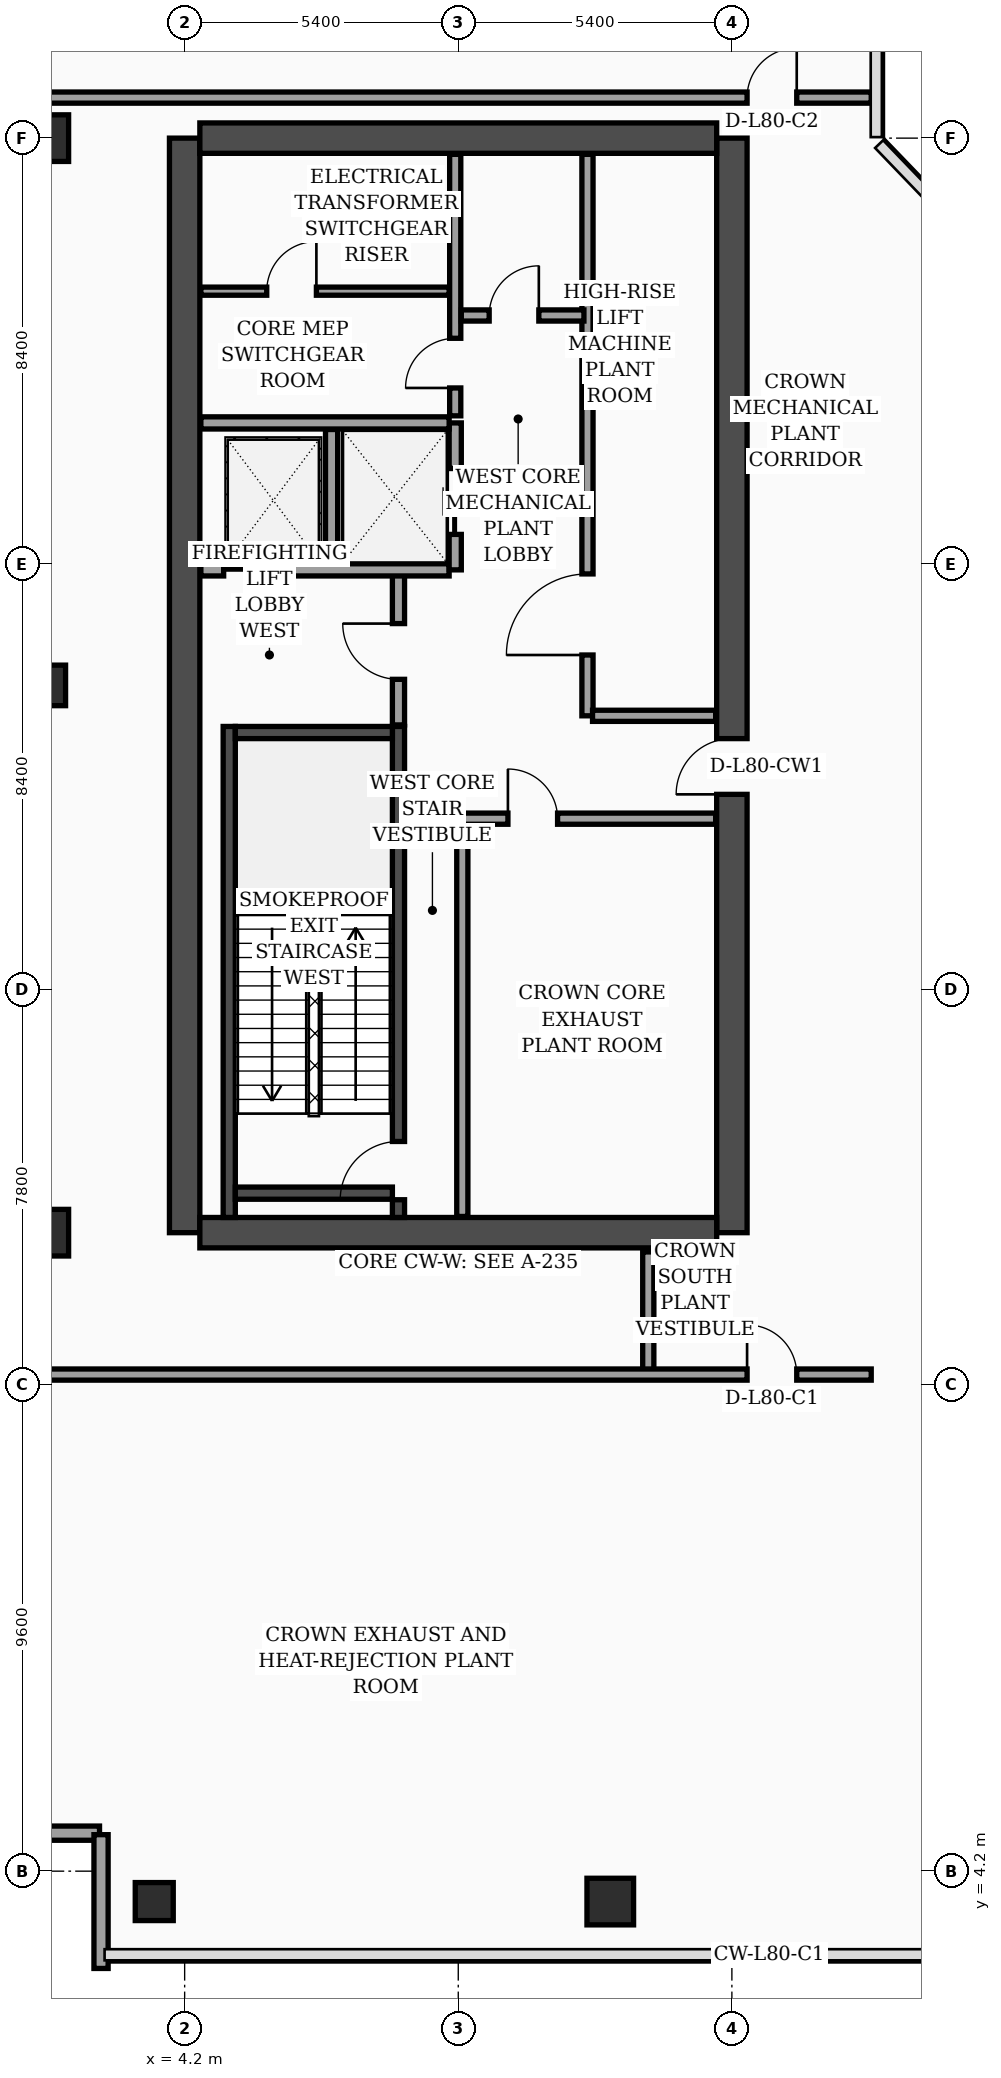
"""IFC4 building model, lengths in metres.
Left out: names, types, materials, properties, quantities, classifications, styles, units other than length and angle.
Written with IfcOpenShell. Run it as: python <this file> out.ifc"""

import sys

from ifc_helpers import new_model, si_unit, direction, frame, frame_2d, origin, origin_2d, place, context, subcontext, project, spatial, rectangle, hollow_rectangle, extrude, element, fill, save


model = new_model("IFC4")
c1 = context("Model", 3, precision=1e-05, world=origin(), true_north=direction((0.0, 1.0)))
c2 = subcontext(c1, "Body", "Model", "MODEL_VIEW")
j1 = project(units=[si_unit("LENGTHUNIT", "METRE"), si_unit("PLANEANGLEUNIT", "RADIAN")], contexts=[c1])
p1 = place(None, origin())
s1 = spatial("IfcSite", under=j1, at=p1, CompositionType="ELEMENT")
p2 = place(p1, origin())
s2 = spatial("IfcBuilding", under=s1, at=p2, CompositionType="ELEMENT")
p3 = place(p2, frame((0.0, 0.0, 325.5)))
s3 = spatial("IfcBuildingStorey", under=s2, at=p3, CompositionType="ELEMENT", Elevation=325.5)
p4 = place(p3, frame((4.2, 16.8, 0.0), z_axis=(0.0, 0.0, 1.0), x_axis=(0.0, 1.0, 0.0)))
e1 = element("IfcWall", 1, at=p4, inside=s3, PredefinedType="SHEAR", context=c2, shape_type="SweptSolid", body=[
    extrude(rectangle(XDim=21.6, YDim=0.6, at=frame_2d((10.8, 0.0))), origin(), (0.0, 0.0, 1.0), 4.76),
])
p5 = place(p3, frame((15.0, 16.8, 0.0), z_axis=(0.0, 0.0, 1.0), x_axis=(0.0, 1.0, 0.0)))
e2 = element("IfcWall", 2, at=p5, inside=s3, PredefinedType="SHEAR", context=c2, shape_type="SweptSolid", body=[
    extrude(rectangle(XDim=21.6, YDim=0.6, at=frame_2d((10.8, 0.0))), origin(), (0.0, 0.0, 1.0), 4.76),
])
p6 = place(p5, frame((8.65, 0.0, 0.0)))
e3 = element("IfcOpeningElement", 3, at=p6, cuts=e2, PredefinedType="OPENING", context=c2, shape_type="SweptSolid", body=[
    extrude(rectangle(XDim=1.1, YDim=2.2, at=frame_2d((0.55, 1.1))), frame((0.0, 0.31, 0.0), z_axis=(0.0, -1.0, 0.0), x_axis=(1.0, 0.0, 0.0)), (0.0, 0.0, 1.0), 0.62),
])
for number, where, z_axis, x_axis in (
    (4, (4.5, 38.4, 0.0), (0.0, 0.0, 1.0), (1.0, 0.0, 0.0)),
    (5, (4.5, 16.8, 0.0), (0.0, 0.0, 1.0), (1.0, 0.0, 0.0)),
):
    element("IfcWall", number, at=place(p3, frame(where, z_axis=z_axis, x_axis=x_axis)), inside=s3, PredefinedType="SHEAR", context=c2, shape_type="SweptSolid", body=[
        extrude(rectangle(XDim=10.2, YDim=0.6, at=frame_2d((5.1, 0.0))), origin(), (0.0, 0.0, 1.0), 4.76),
    ])
p7 = place(p3, frame((5.08, 17.1, 0.0), z_axis=(0.0, 0.0, 1.0), x_axis=(0.0, 1.0, 0.0)))
e6 = element("IfcWall", 6, at=p7, inside=s3, PredefinedType="SOLIDWALL", context=c2, shape_type="SweptSolid", body=[
    extrude(rectangle(XDim=9.69, YDim=0.24, at=frame_2d((4.845, 0.0))), origin(), (0.0, 0.0, 1.0), 4.76),
])
p8 = place(p3, frame((8.42, 17.1, 0.0), z_axis=(0.0, 0.0, 1.0), x_axis=(0.0, 1.0, 0.0)))
e7 = element("IfcWall", 7, at=p8, inside=s3, PredefinedType="SOLIDWALL", context=c2, shape_type="SweptSolid", body=[
    extrude(rectangle(XDim=9.69, YDim=0.24, at=frame_2d((4.845, 0.0))), origin(), (0.0, 0.0, 1.0), 4.76),
])
p9 = place(p8, frame((0.35, 0.0, 0.0)))
e8 = element("IfcOpeningElement", 8, at=p9, cuts=e7, PredefinedType="OPENING", context=c2, shape_type="SweptSolid", body=[
    extrude(rectangle(XDim=1.15, YDim=2.2, at=frame_2d((0.575, 1.1))), frame((0.0, 0.13, 0.0), z_axis=(0.0, -1.0, 0.0), x_axis=(1.0, 0.0, 0.0)), (0.0, 0.0, 1.0), 0.26),
])
for number, where, z_axis, x_axis in (
    (9, (5.2, 17.58, 0.0), (0.0, 0.0, 1.0), (1.0, 0.0, 0.0)),
    (10, (5.2, 26.67, 0.0), (0.0, 0.0, 1.0), (1.0, 0.0, 0.0)),
):
    element("IfcWall", number, at=place(p3, frame(where, z_axis=z_axis, x_axis=x_axis)), inside=s3, PredefinedType="SOLIDWALL", context=c2, shape_type="SweptSolid", body=[
        extrude(rectangle(XDim=3.1, YDim=0.24, at=frame_2d((1.55, 0.0))), origin(), (0.0, 0.0, 1.0), 4.76),
    ])
p10 = place(p3, frame((3.6, 3.6, 0.0), z_axis=(0.0, 0.0, 1.0), x_axis=(1.0, 0.0, 0.0)))
e11 = element("IfcColumn", 11, at=p10, inside=s3, PredefinedType="COLUMN", context=c2, shape_type="SweptSolid", body=[
    extrude(hollow_rectangle(XDim=0.75, YDim=0.75, WallThickness=0.032, at=origin_2d()), origin(), (0.0, 0.0, 1.0), 4.76),
])
p11 = place(p3, frame((1.45, 16.8, 0.0), z_axis=(0.0, 0.0, 1.0), x_axis=(1.0, 0.0, 0.0)))
e12 = element("IfcColumn", 12, at=p11, inside=s3, PredefinedType="COLUMN", context=c2, shape_type="SweptSolid", body=[
    extrude(rectangle(XDim=0.92, YDim=0.92, at=origin_2d()), origin(), (0.0, 0.0, 1.0), 4.76),
])
p12 = place(p3, frame((1.45, 27.6, 0.0), z_axis=(0.0, 0.0, 1.0), x_axis=(1.0, 0.0, 0.0)))
e13 = element("IfcColumn", 13, at=p12, inside=s3, PredefinedType="COLUMN", context=c2, shape_type="SweptSolid", body=[
    extrude(rectangle(XDim=0.8, YDim=0.8, at=origin_2d()), origin(), (0.0, 0.0, 1.0), 4.76),
])
for number, where, z_axis, x_axis in (
    (14, (1.45, 38.4, 0.0), (0.0, 0.0, 1.0), (1.0, 0.0, 0.0)),
    (15, (12.6, 3.6, 0.0), (0.0, 0.0, 1.0), (1.0, 0.0, 0.0)),
):
    element("IfcColumn", number, at=place(p3, frame(where, z_axis=z_axis, x_axis=x_axis)), inside=s3, PredefinedType="COLUMN", context=c2, shape_type="SweptSolid", body=[
        extrude(rectangle(XDim=0.92, YDim=0.92, at=origin_2d()), origin(), (0.0, 0.0, 1.0), 4.76),
    ])
p13 = place(p3, frame((-0.12, 4.95, 0.0), z_axis=(0.0, 0.0, 1.0), x_axis=(1.0, 0.0, 0.0)))
e16 = element("IfcWall", 16, at=p13, inside=s3, PredefinedType="SOLIDWALL", context=c2, shape_type="SweptSolid", body=[
    extrude(rectangle(XDim=2.64, YDim=0.28, at=frame_2d((1.32, 0.0))), origin(), (0.0, 0.0, 1.0), 4.76),
])
p14 = place(p3, frame((2.55, 4.92, 0.0), z_axis=(0.0, 0.0, 1.0), x_axis=(0.0, -1.0, 0.0)))
e17 = element("IfcWall", 17, at=p14, inside=s3, PredefinedType="SOLIDWALL", context=c2, shape_type="SweptSolid", body=[
    extrude(rectangle(XDim=2.64, YDim=0.28, at=frame_2d((1.32, 0.0))), origin(), (0.0, 0.0, 1.0), 4.76),
])
p15 = place(p3, frame((8.42, 26.82, 0.0), z_axis=(0.0, 0.0, 1.0), x_axis=(0.0, 1.0, 0.0)))
e18 = element("IfcWall", 18, at=p15, inside=s3, PredefinedType="SOLIDWALL", context=c2, shape_type="SweptSolid", body=[
    extrude(rectangle(XDim=3.0, YDim=0.24, at=frame_2d((1.5, 0.0))), origin(), (0.0, 0.0, 1.0), 4.76),
])
p16 = place(p15, frame((0.9, 0.0, 0.0)))
e19 = element("IfcOpeningElement", 19, at=p16, cuts=e18, PredefinedType="OPENING", context=c2, shape_type="SweptSolid", body=[
    extrude(rectangle(XDim=1.1, YDim=2.2, at=frame_2d((0.55, 1.1))), frame((0.0, 0.13, 0.0), z_axis=(0.0, -1.0, 0.0), x_axis=(1.0, 0.0, 0.0)), (0.0, 0.0, 1.0), 0.26),
])
p17 = place(p3, frame((4.52, 29.88, 0.0), z_axis=(0.0, 0.0, 1.0), x_axis=(1.0, 0.0, 0.0)))
e20 = element("IfcWall", 20, at=p17, inside=s3, PredefinedType="SOLIDWALL", context=c2, shape_type="SweptSolid", body=[
    extrude(rectangle(XDim=4.9, YDim=0.24, at=frame_2d((2.45, 0.0))), origin(), (0.0, 0.0, 1.0), 4.76),
])
p18 = place(p17, frame((0.45, 0.0, 0.0)))
e21 = element("IfcOpeningElement", 21, at=p18, cuts=e20, PredefinedType="OPENING", context=c2, shape_type="SweptSolid", body=[
    extrude(rectangle(XDim=1.3, YDim=2.35, at=frame_2d((0.65, 1.175))), frame((0.0, 0.13, 0.0), z_axis=(0.0, -1.0, 0.0), x_axis=(1.0, 0.0, 0.0)), (0.0, 0.0, 1.0), 0.26),
])
p19 = place(p3, frame((7.1, 30.02, 0.0), z_axis=(0.0, 0.0, 1.0), x_axis=(0.0, 1.0, 0.0)))
e22 = element("IfcWall", 22, at=p19, inside=s3, PredefinedType="SOLIDWALL", context=c2, shape_type="SweptSolid", body=[
    extrude(rectangle(XDim=2.63, YDim=0.24, at=frame_2d((1.315, 0.0))), origin(), (0.0, 0.0, 1.0), 4.76),
])
p20 = place(p3, frame((9.54, 29.88, 0.0), z_axis=(0.0, 0.0, 1.0), x_axis=(0.0, 1.0, 0.0)))
e23 = element("IfcWall", 23, at=p20, inside=s3, PredefinedType="SOLIDWALL", context=c2, shape_type="SweptSolid", body=[
    extrude(rectangle(XDim=2.9, YDim=0.24, at=frame_2d((1.45, 0.0))), origin(), (0.0, 0.0, 1.0), 4.76),
])
p21 = place(p20, frame((0.7, 0.0, 0.0)))
e24 = element("IfcOpeningElement", 24, at=p21, cuts=e23, PredefinedType="OPENING", context=c2, shape_type="SweptSolid", body=[
    extrude(rectangle(XDim=1.3, YDim=2.35, at=frame_2d((0.65, 1.175))), frame((0.0, 0.13, 0.0), z_axis=(0.0, -1.0, 0.0), x_axis=(1.0, 0.0, 0.0)), (0.0, 0.0, 1.0), 0.26),
])
p22 = place(p3, frame((4.52, 32.78, 0.0), z_axis=(0.0, 0.0, 1.0), x_axis=(1.0, 0.0, 0.0)))
e25 = element("IfcWall", 25, at=p22, inside=s3, PredefinedType="SOLIDWALL", context=c2, shape_type="SweptSolid", body=[
    extrude(rectangle(XDim=4.9, YDim=0.24, at=frame_2d((2.45, 0.0))), origin(), (0.0, 0.0, 1.0), 4.76),
])
p23 = place(p3, frame((9.68, 17.12, 0.0), z_axis=(0.0, 0.0, 1.0), x_axis=(0.0, 1.0, 0.0)))
e26 = element("IfcWall", 26, at=p23, inside=s3, PredefinedType="SOLIDWALL", context=c2, shape_type="SweptSolid", body=[
    extrude(rectangle(XDim=7.88, YDim=0.22, at=frame_2d((3.94, 0.0))), origin(), (0.0, 0.0, 1.0), 4.76),
])
p24 = place(p3, frame((4.52, 35.38, 0.0), z_axis=(0.0, 0.0, 1.0), x_axis=(1.0, 0.0, 0.0)))
e27 = element("IfcWall", 27, at=p24, inside=s3, PredefinedType="PARTITIONING", context=c2, shape_type="SweptSolid", body=[
    extrude(rectangle(XDim=4.9, YDim=0.16, at=frame_2d((2.45, 0.0))), origin(), (0.0, 0.0, 1.0), 4.76),
])
p25 = place(p24, frame((1.3, 0.0, 0.0)))
e28 = element("IfcOpeningElement", 28, at=p25, cuts=e27, PredefinedType="OPENING", context=c2, shape_type="SweptSolid", body=[
    extrude(rectangle(XDim=0.98, YDim=2.15, at=frame_2d((0.49, 1.075))), frame((0.0, 0.09, 0.0), z_axis=(0.0, -1.0, 0.0), x_axis=(1.0, 0.0, 0.0)), (0.0, 0.0, 1.0), 0.18),
])
p26 = place(p3, frame((9.54, 32.92, 0.0), z_axis=(0.0, 0.0, 1.0), x_axis=(0.0, 1.0, 0.0)))
e29 = element("IfcWall", 29, at=p26, inside=s3, PredefinedType="SOLIDWALL", context=c2, shape_type="SweptSolid", body=[
    extrude(rectangle(XDim=5.16, YDim=0.22, at=frame_2d((2.58, 0.0))), origin(), (0.0, 0.0, 1.0), 4.76),
])
p27 = place(p26, frame((0.55, 0.0, 0.0)))
e30 = element("IfcOpeningElement", 30, at=p27, cuts=e29, PredefinedType="OPENING", context=c2, shape_type="SweptSolid", body=[
    extrude(rectangle(XDim=0.98, YDim=2.15, at=frame_2d((0.49, 1.075))), frame((0.0, 0.12, 0.0), z_axis=(0.0, -1.0, 0.0), x_axis=(1.0, 0.0, 0.0)), (0.0, 0.0, 1.0), 0.24),
])
p28 = place(p3, frame((9.68, 24.97, 0.0), z_axis=(0.0, 0.0, 1.0), x_axis=(1.0, 0.0, 0.0)))
e31 = element("IfcWall", 31, at=p28, inside=s3, PredefinedType="SOLIDWALL", context=c2, shape_type="SweptSolid", body=[
    extrude(rectangle(XDim=5.0, YDim=0.22, at=frame_2d((2.5, 0.0))), origin(), (0.0, 0.0, 1.0), 4.76),
])
p29 = place(p28, frame((0.9, 0.0, 0.0)))
e32 = element("IfcOpeningElement", 32, at=p29, cuts=e31, PredefinedType="OPENING", context=c2, shape_type="SweptSolid", body=[
    extrude(rectangle(XDim=0.98, YDim=2.15, at=frame_2d((0.49, 1.075))), frame((0.0, 0.12, 0.0), z_axis=(0.0, -1.0, 0.0), x_axis=(1.0, 0.0, 0.0)), (0.0, 0.0, 1.0), 0.24),
])
p30 = place(p3, frame((12.15, 27.0, 0.0), z_axis=(0.0, 0.0, 1.0), x_axis=(0.0, 1.0, 0.0)))
e33 = element("IfcWall", 33, at=p30, inside=s3, PredefinedType="SOLIDWALL", context=c2, shape_type="SweptSolid", body=[
    extrude(rectangle(XDim=11.08, YDim=0.22, at=frame_2d((5.54, 0.0))), origin(), (0.0, 0.0, 1.0), 4.76),
])
p31 = place(p30, frame((1.2, 0.0, 0.0)))
e34 = element("IfcOpeningElement", 34, at=p31, cuts=e33, PredefinedType="OPENING", context=c2, shape_type="SweptSolid", body=[
    extrude(rectangle(XDim=1.6, YDim=2.35, at=frame_2d((0.8, 1.175))), frame((0.0, 0.12, 0.0), z_axis=(0.0, -1.0, 0.0), x_axis=(1.0, 0.0, 0.0)), (0.0, 0.0, 1.0), 0.24),
])
p32 = place(p3, frame((12.25, 27.0, 0.0), z_axis=(0.0, 0.0, 1.0), x_axis=(1.0, 0.0, 0.0)))
e35 = element("IfcWall", 35, at=p32, inside=s3, PredefinedType="SOLIDWALL", context=c2, shape_type="SweptSolid", body=[
    extrude(rectangle(XDim=2.43, YDim=0.22, at=frame_2d((1.215, 0.0))), origin(), (0.0, 0.0, 1.0), 4.76),
])
p33 = place(p3, frame((9.66, 34.9, 0.0), z_axis=(0.0, 0.0, 1.0), x_axis=(1.0, 0.0, 0.0)))
e36 = element("IfcWall", 36, at=p33, inside=s3, PredefinedType="SOLIDWALL", context=c2, shape_type="SweptSolid", body=[
    extrude(rectangle(XDim=2.42, YDim=0.22, at=frame_2d((1.21, 0.0))), origin(), (0.0, 0.0, 1.0), 4.76),
])
p34 = place(p33, frame((0.55, 0.0, 0.0)))
e37 = element("IfcOpeningElement", 37, at=p34, cuts=e36, PredefinedType="OPENING", context=c2, shape_type="SweptSolid", body=[
    extrude(rectangle(XDim=0.98, YDim=2.15, at=frame_2d((0.49, 1.075))), frame((0.0, 0.12, 0.0), z_axis=(0.0, -1.0, 0.0), x_axis=(1.0, 0.0, 0.0)), (0.0, 0.0, 1.0), 0.24),
])
p35 = place(p3, frame((13.35, 14.0, 0.0), z_axis=(0.0, 0.0, 1.0), x_axis=(0.0, 1.0, 0.0)))
e38 = element("IfcWall", 38, at=p35, inside=s3, PredefinedType="SOLIDWALL", context=c2, shape_type="SweptSolid", body=[
    extrude(rectangle(XDim=2.42, YDim=0.22, at=frame_2d((1.21, 0.0))), origin(), (0.0, 0.0, 1.0), 4.76),
])
p36 = place(p3, frame((0.08, 14.0, 0.0), z_axis=(0.0, 0.0, 1.0), x_axis=(1.0, 0.0, 0.0)))
e39 = element("IfcWall", 39, at=p36, inside=s3, PredefinedType="SOLIDWALL", context=c2, shape_type="SweptSolid", body=[
    extrude(rectangle(XDim=17.67, YDim=0.22, at=frame_2d((8.835, 0.0))), origin(), (0.0, 0.0, 1.0), 4.19),
])
p37 = place(p36, frame((15.22, 0.0, 0.0)))
e40 = element("IfcOpeningElement", 40, at=p37, cuts=e39, PredefinedType="OPENING", context=c2, shape_type="SweptSolid", body=[
    extrude(rectangle(XDim=0.98, YDim=2.15, at=frame_2d((0.49, 1.075))), frame((0.0, 0.12, 0.0), z_axis=(0.0, -1.0, 0.0), x_axis=(1.0, 0.0, 0.0)), (0.0, 0.0, 1.0), 0.24),
])
p38 = place(p3, frame((0.08, 39.2, 0.0), z_axis=(0.0, 0.0, 1.0), x_axis=(1.0, 0.0, 0.0)))
e41 = element("IfcWall", 41, at=p38, inside=s3, PredefinedType="SOLIDWALL", context=c2, shape_type="SweptSolid", body=[
    extrude(rectangle(XDim=17.67, YDim=0.22, at=frame_2d((8.835, 0.0))), origin(), (0.0, 0.0, 1.0), 4.19),
])
p39 = place(p38, frame((15.22, 0.0, 0.0)))
e42 = element("IfcOpeningElement", 42, at=p39, cuts=e41, PredefinedType="OPENING", context=c2, shape_type="SweptSolid", body=[
    extrude(rectangle(XDim=0.98, YDim=2.15, at=frame_2d((0.49, 1.075))), frame((0.0, 0.12, 0.0), z_axis=(0.0, -1.0, 0.0), x_axis=(1.0, 0.0, 0.0)), (0.0, 0.0, 1.0), 0.24),
])
p40 = place(p16, origin())
e43 = element("IfcDoor", 43, at=p40, inside=s3, OperationType="SINGLE_SWING_RIGHT", PredefinedType="DOOR", context=c2, shape_type="SweptSolid", body=[
    extrude(rectangle(XDim=1.1, YDim=2.2, at=frame_2d((0.55, 1.1))), frame((0.0, 0.025, 0.0), z_axis=(0.0, -1.0, 0.0), x_axis=(1.0, 0.0, 0.0)), (0.0, 0.0, 1.0), 0.05),
])
fill(e19, e43)
p41 = place(p18, origin())
e44 = element("IfcDoor", 44, at=p41, inside=s3, OperationType="DOUBLE_DOOR_SLIDING", PredefinedType="DOOR", context=c2, shape_type="SweptSolid", body=[
    extrude(rectangle(XDim=1.3, YDim=2.35, at=frame_2d((0.65, 1.175))), frame((0.0, 0.025, 0.0), z_axis=(0.0, -1.0, 0.0), x_axis=(1.0, 0.0, 0.0)), (0.0, 0.0, 1.0), 0.05),
])
fill(e21, e44)
p42 = place(p21, origin())
e45 = element("IfcDoor", 45, at=p42, inside=s3, OperationType="DOUBLE_DOOR_SLIDING", PredefinedType="DOOR", context=c2, shape_type="SweptSolid", body=[
    extrude(rectangle(XDim=1.3, YDim=2.35, at=frame_2d((0.65, 1.175))), frame((0.0, 0.025, 0.0), z_axis=(0.0, -1.0, 0.0), x_axis=(1.0, 0.0, 0.0)), (0.0, 0.0, 1.0), 0.05),
])
fill(e24, e45)
p43 = place(p25, origin())
e46 = element("IfcDoor", 46, at=p43, inside=s3, OperationType="SINGLE_SWING_RIGHT", PredefinedType="DOOR", context=c2, shape_type="SweptSolid", body=[
    extrude(rectangle(XDim=0.98, YDim=2.15, at=frame_2d((0.49, 1.075))), frame((0.0, 0.025, 0.0), z_axis=(0.0, -1.0, 0.0), x_axis=(1.0, 0.0, 0.0)), (0.0, 0.0, 1.0), 0.05),
])
fill(e28, e46)
p44 = place(p27, origin())
e47 = element("IfcDoor", 47, at=p44, inside=s3, OperationType="SINGLE_SWING_LEFT", PredefinedType="DOOR", context=c2, shape_type="SweptSolid", body=[
    extrude(rectangle(XDim=0.98, YDim=2.15, at=frame_2d((0.49, 1.075))), frame((0.0, 0.025, 0.0), z_axis=(0.0, -1.0, 0.0), x_axis=(1.0, 0.0, 0.0)), (0.0, 0.0, 1.0), 0.05),
])
fill(e30, e47)
p45 = place(p29, origin())
e48 = element("IfcDoor", 48, at=p45, inside=s3, OperationType="SINGLE_SWING_LEFT", PredefinedType="DOOR", context=c2, shape_type="SweptSolid", body=[
    extrude(rectangle(XDim=0.98, YDim=2.15, at=frame_2d((0.49, 1.075))), frame((0.0, 0.025, 0.0), z_axis=(0.0, -1.0, 0.0), x_axis=(1.0, 0.0, 0.0)), (0.0, 0.0, 1.0), 0.05),
])
fill(e32, e48)
p46 = place(p31, origin())
e49 = element("IfcDoor", 49, at=p46, inside=s3, OperationType="SINGLE_SWING_LEFT", PredefinedType="DOOR", context=c2, shape_type="SweptSolid", body=[
    extrude(rectangle(XDim=1.6, YDim=2.35, at=frame_2d((0.8, 1.175))), frame((0.0, 0.025, 0.0), z_axis=(0.0, -1.0, 0.0), x_axis=(1.0, 0.0, 0.0)), (0.0, 0.0, 1.0), 0.05),
])
fill(e34, e49)
p47 = place(p34, origin())
e50 = element("IfcDoor", 50, at=p47, inside=s3, OperationType="SINGLE_SWING_RIGHT", PredefinedType="DOOR", context=c2, shape_type="SweptSolid", body=[
    extrude(rectangle(XDim=0.98, YDim=2.15, at=frame_2d((0.49, 1.075))), frame((0.0, 0.025, 0.0), z_axis=(0.0, -1.0, 0.0), x_axis=(1.0, 0.0, 0.0)), (0.0, 0.0, 1.0), 0.05),
])
fill(e37, e50)
p48 = place(p37, origin())
e51 = element("IfcDoor", 51, at=p48, inside=s3, OperationType="SINGLE_SWING_LEFT", PredefinedType="DOOR", context=c2, shape_type="SweptSolid", body=[
    extrude(rectangle(XDim=0.98, YDim=2.15, at=frame_2d((0.49, 1.075))), frame((0.0, 0.025, 0.0), z_axis=(0.0, -1.0, 0.0), x_axis=(1.0, 0.0, 0.0)), (0.0, 0.0, 1.0), 0.05),
])
fill(e40, e51)
p49 = place(p39, origin())
e52 = element("IfcDoor", 52, at=p49, inside=s3, OperationType="SINGLE_SWING_RIGHT", PredefinedType="DOOR", context=c2, shape_type="SweptSolid", body=[
    extrude(rectangle(XDim=0.98, YDim=2.15, at=frame_2d((0.49, 1.075))), frame((0.0, 0.025, 0.0), z_axis=(0.0, -1.0, 0.0), x_axis=(1.0, 0.0, 0.0)), (0.0, 0.0, 1.0), 0.05),
])
fill(e42, e52)
p50 = place(p9, origin())
e53 = element("IfcDoor", 53, at=p50, inside=s3, OperationType="SINGLE_SWING_LEFT", PredefinedType="DOOR", context=c2, shape_type="SweptSolid", body=[
    extrude(rectangle(XDim=1.15, YDim=2.2, at=frame_2d((0.575, 1.1))), frame((0.0, 0.025, 0.0), z_axis=(0.0, -1.0, 0.0), x_axis=(1.0, 0.0, 0.0)), (0.0, 0.0, 1.0), 0.05),
])
fill(e8, e53)
p51 = place(p6, origin())
e54 = element("IfcDoor", 54, at=p51, inside=s3, OperationType="SINGLE_SWING_LEFT", PredefinedType="DOOR", context=c2, shape_type="SweptSolid", body=[
    extrude(rectangle(XDim=1.1, YDim=2.2, at=frame_2d((0.55, 1.1))), frame((0.0, 0.025, 0.0), z_axis=(0.0, -1.0, 0.0), x_axis=(1.0, 0.0, 0.0)), (0.0, 0.0, 1.0), 0.05),
])
fill(e3, e54)
save(model, sys.argv[1])
